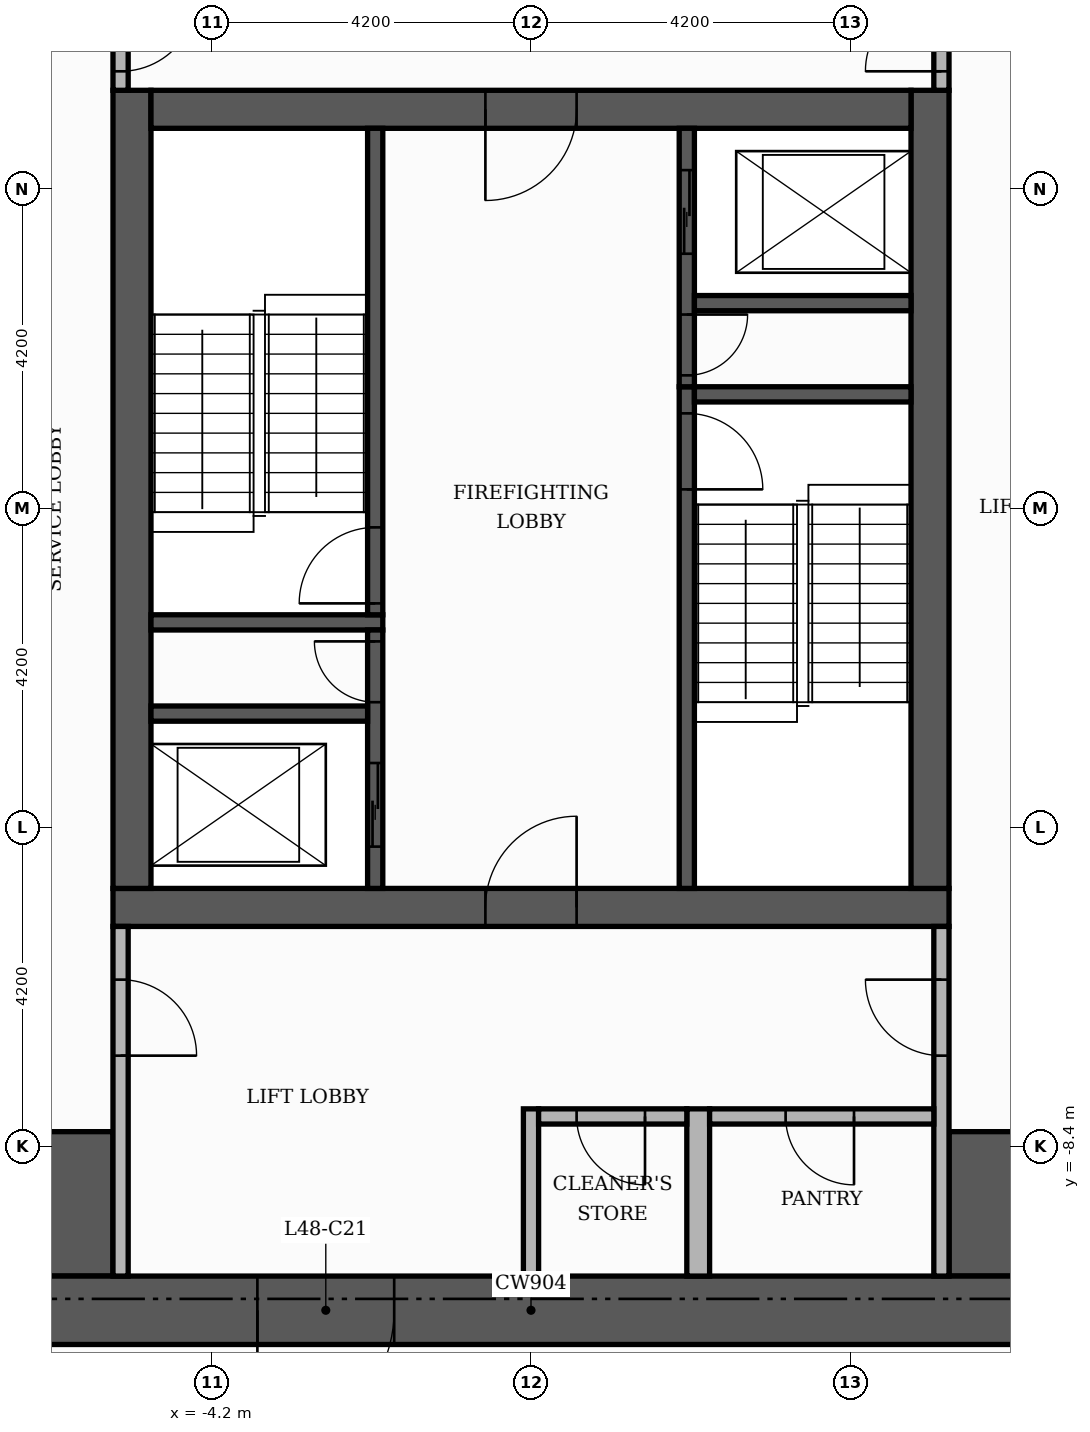
"""IFC4 building model, lengths in metres.
Left out: names, types, materials, properties, quantities, classifications, styles, units other than length and angle.
Written with IfcOpenShell. Run it as: python <this file> out.ifc"""

import sys

from ifc_helpers import new_model, si_unit, direction, frame, frame_2d, origin, place, context, subcontext, project, spatial, rectangle, extrude, element, fill, save


model = new_model("IFC4")
c1 = context("Model", 3, precision=1e-05, world=origin(), true_north=direction((0.0, 1.0)))
c2 = subcontext(c1, "Body", "Model", "MODEL_VIEW")
j1 = project(units=[si_unit("LENGTHUNIT", "METRE"), si_unit("PLANEANGLEUNIT", "RADIAN")], contexts=[c1])
p1 = place(None, origin())
s1 = spatial("IfcSite", under=j1, at=p1, CompositionType="ELEMENT")
p2 = place(p1, origin())
s2 = spatial("IfcBuilding", under=s1, at=p2, CompositionType="ELEMENT")
p3 = place(p2, frame((0.0, 0.0, 204.0)))
s3 = spatial("IfcBuildingStorey", under=s2, at=p3, CompositionType="ELEMENT", Elevation=204.0)
p4 = place(p3, frame((-5.5, -5.25, 0.0), z_axis=(0.0, 0.0, 1.0), x_axis=(1.0, 0.0, 0.0)))
e1 = element("IfcWall", 1, at=p4, inside=s3, PredefinedType="SHEAR", context=c2, shape_type="SweptSolid", body=[
    extrude(rectangle(XDim=11.0, YDim=0.5, at=frame_2d((5.5, 0.0))), origin(), (0.0, 0.0, 1.0), 3.48),
])
p5 = place(p4, frame((4.9, 0.0, 0.0)))
e2 = element("IfcOpeningElement", 2, at=p5, cuts=e1, PredefinedType="OPENING", context=c2, shape_type="SweptSolid", body=[
    extrude(rectangle(XDim=1.2, YDim=2.1, at=frame_2d((0.6, 1.05))), frame((0.0, 0.26, 0.0), z_axis=(0.0, -1.0, 0.0), x_axis=(1.0, 0.0, 0.0)), (0.0, 0.0, 1.0), 0.52),
])
for number, where, z_axis, x_axis in (
    (3, (-5.25, -5.0, 0.0), (0.0, 0.0, 1.0), (0.0, 1.0, 0.0)),
    (4, (5.25, -5.0, 0.0), (0.0, 0.0, 1.0), (0.0, 1.0, 0.0)),
):
    element("IfcWall", number, at=place(p3, frame(where, z_axis=z_axis, x_axis=x_axis)), inside=s3, PredefinedType="SHEAR", context=c2, shape_type="SweptSolid", body=[
        extrude(rectangle(XDim=10.5, YDim=0.5, at=frame_2d((5.25, 0.0))), origin(), (0.0, 0.0, 1.0), 3.48),
    ])
p6 = place(p3, frame((-5.0, 5.25, 0.0), z_axis=(0.0, 0.0, 1.0), x_axis=(1.0, 0.0, 0.0)))
e5 = element("IfcWall", 5, at=p6, inside=s3, PredefinedType="SHEAR", context=c2, shape_type="SweptSolid", body=[
    extrude(rectangle(XDim=10.0, YDim=0.5, at=frame_2d((5.0, 0.0))), origin(), (0.0, 0.0, 1.0), 3.48),
])
p7 = place(p6, frame((4.4, 0.0, 0.0)))
e6 = element("IfcOpeningElement", 6, at=p7, cuts=e5, PredefinedType="OPENING", context=c2, shape_type="SweptSolid", body=[
    extrude(rectangle(XDim=1.2, YDim=2.1, at=frame_2d((0.6, 1.05))), frame((0.0, 0.26, 0.0), z_axis=(0.0, -1.0, 0.0), x_axis=(1.0, 0.0, 0.0)), (0.0, 0.0, 1.0), 0.52),
])
for number, where, z_axis, x_axis in (
    (7, (-10.1, -9.15, 0.0), (0.0, 0.0, 1.0), (1.0, 0.0, 0.0)),
    (8, (5.5, -9.15, 0.0), (0.0, 0.0, 1.0), (1.0, 0.0, 0.0)),
):
    element("IfcWall", number, at=place(p3, frame(where, z_axis=z_axis, x_axis=x_axis)), inside=s3, PredefinedType="SHEAR", context=c2, shape_type="SweptSolid", body=[
        extrude(rectangle(XDim=4.6, YDim=1.9, at=frame_2d((2.3, 0.0))), origin(), (0.0, 0.0, 1.0), 3.48),
    ])
p8 = place(p3, frame((2.05, -5.0, 0.0), z_axis=(0.0, 0.0, 1.0), x_axis=(0.0, 1.0, 0.0)))
e9 = element("IfcWall", 9, at=p8, inside=s3, PredefinedType="SHEAR", context=c2, shape_type="SweptSolid", body=[
    extrude(rectangle(XDim=6.6, YDim=0.2, at=frame_2d((3.3, 0.0))), origin(), (0.0, 0.0, 1.0), 3.48),
])
p9 = place(p8, frame((5.25, 0.0, 0.0)))
e10 = element("IfcOpeningElement", 10, at=p9, cuts=e9, PredefinedType="OPENING", context=c2, shape_type="SweptSolid", body=[
    extrude(rectangle(XDim=1.0, YDim=2.1, at=frame_2d((0.5, 1.05))), frame((0.0, 0.11, 0.0), z_axis=(0.0, -1.0, 0.0), x_axis=(1.0, 0.0, 0.0)), (0.0, 0.0, 1.0), 0.22),
])
p10 = place(p3, frame((-5.0, -1.5, 0.0), z_axis=(0.0, 0.0, 1.0), x_axis=(1.0, 0.0, 0.0)))
e11 = element("IfcWall", 11, at=p10, inside=s3, PredefinedType="SHEAR", context=c2, shape_type="SweptSolid", body=[
    extrude(rectangle(XDim=3.05, YDim=0.2, at=frame_2d((1.525, 0.0))), origin(), (0.0, 0.0, 1.0), 3.48),
])
p11 = place(p3, frame((-2.05, -1.4, 0.0), z_axis=(0.0, 0.0, 1.0), x_axis=(0.0, 1.0, 0.0)))
e12 = element("IfcWall", 12, at=p11, inside=s3, PredefinedType="SHEAR", context=c2, shape_type="SweptSolid", body=[
    extrude(rectangle(XDim=6.4, YDim=0.2, at=frame_2d((3.2, 0.0))), origin(), (0.0, 0.0, 1.0), 3.48),
])
p12 = place(p11, frame((0.15, 0.0, 0.0)))
e13 = element("IfcOpeningElement", 13, at=p12, cuts=e12, PredefinedType="OPENING", context=c2, shape_type="SweptSolid", body=[
    extrude(rectangle(XDim=1.0, YDim=2.1, at=frame_2d((0.5, 1.05))), frame((0.0, 0.11, 0.0), z_axis=(0.0, -1.0, 0.0), x_axis=(1.0, 0.0, 0.0)), (0.0, 0.0, 1.0), 0.22),
])
p13 = place(p3, frame((2.15, 1.5, 0.0), z_axis=(0.0, 0.0, 1.0), x_axis=(1.0, 0.0, 0.0)))
e14 = element("IfcWall", 14, at=p13, inside=s3, PredefinedType="SHEAR", context=c2, shape_type="SweptSolid", body=[
    extrude(rectangle(XDim=2.85, YDim=0.2, at=frame_2d((1.425, 0.0))), origin(), (0.0, 0.0, 1.0), 3.48),
])
p14 = place(p3, frame((-2.05, -5.0, 0.0), z_axis=(0.0, 0.0, 1.0), x_axis=(0.0, 1.0, 0.0)))
e15 = element("IfcWall", 15, at=p14, inside=s3, PredefinedType="SHEAR", context=c2, shape_type="SweptSolid", body=[
    extrude(rectangle(XDim=3.4, YDim=0.2, at=frame_2d((1.7, 0.0))), origin(), (0.0, 0.0, 1.0), 3.48),
])
p15 = place(p14, frame((0.55, 0.0, 0.0)))
e16 = element("IfcOpeningElement", 16, at=p15, cuts=e15, PredefinedType="OPENING", context=c2, shape_type="SweptSolid", body=[
    extrude(rectangle(XDim=1.1, YDim=2.1, at=frame_2d((0.55, 1.05))), frame((0.0, 0.11, 0.0), z_axis=(0.0, -1.0, 0.0), x_axis=(1.0, 0.0, 0.0)), (0.0, 0.0, 1.0), 0.22),
])
p16 = place(p14, frame((2.45, 0.0, 0.0)))
e17 = element("IfcOpeningElement", 17, at=p16, cuts=e15, PredefinedType="OPENING", context=c2, shape_type="SweptSolid", body=[
    extrude(rectangle(XDim=0.8, YDim=2.1, at=frame_2d((0.4, 1.05))), frame((0.0, 0.11, 0.0), z_axis=(0.0, -1.0, 0.0), x_axis=(1.0, 0.0, 0.0)), (0.0, 0.0, 1.0), 0.22),
])
p17 = place(p3, frame((-5.0, -2.7, 0.0), z_axis=(0.0, 0.0, 1.0), x_axis=(1.0, 0.0, 0.0)))
e18 = element("IfcWall", 18, at=p17, inside=s3, PredefinedType="SHEAR", context=c2, shape_type="SweptSolid", body=[
    extrude(rectangle(XDim=2.85, YDim=0.2, at=frame_2d((1.425, 0.0))), origin(), (0.0, 0.0, 1.0), 3.48),
])
p18 = place(p3, frame((2.05, 1.6, 0.0), z_axis=(0.0, 0.0, 1.0), x_axis=(0.0, 1.0, 0.0)))
e19 = element("IfcWall", 19, at=p18, inside=s3, PredefinedType="SHEAR", context=c2, shape_type="SweptSolid", body=[
    extrude(rectangle(XDim=3.4, YDim=0.2, at=frame_2d((1.7, 0.0))), origin(), (0.0, 0.0, 1.0), 3.48),
])
p19 = place(p18, frame((1.75, 0.0, 0.0)))
e20 = element("IfcOpeningElement", 20, at=p19, cuts=e19, PredefinedType="OPENING", context=c2, shape_type="SweptSolid", body=[
    extrude(rectangle(XDim=1.1, YDim=2.1, at=frame_2d((0.55, 1.05))), frame((0.0, 0.11, 0.0), z_axis=(0.0, -1.0, 0.0), x_axis=(1.0, 0.0, 0.0)), (0.0, 0.0, 1.0), 0.22),
])
p20 = place(p18, frame((0.15, 0.0, 0.0)))
e21 = element("IfcOpeningElement", 21, at=p20, cuts=e19, PredefinedType="OPENING", context=c2, shape_type="SweptSolid", body=[
    extrude(rectangle(XDim=0.8, YDim=2.1, at=frame_2d((0.4, 1.05))), frame((0.0, 0.11, 0.0), z_axis=(0.0, -1.0, 0.0), x_axis=(1.0, 0.0, 0.0)), (0.0, 0.0, 1.0), 0.22),
])
p21 = place(p3, frame((2.15, 2.7, 0.0), z_axis=(0.0, 0.0, 1.0), x_axis=(1.0, 0.0, 0.0)))
e22 = element("IfcWall", 22, at=p21, inside=s3, PredefinedType="SHEAR", context=c2, shape_type="SweptSolid", body=[
    extrude(rectangle(XDim=2.85, YDim=0.2, at=frame_2d((1.425, 0.0))), origin(), (0.0, 0.0, 1.0), 3.48),
])
p22 = place(p3, frame((-11.0, -10.55, 0.0), z_axis=(0.0, 0.0, 1.0), x_axis=(1.0, 0.0, 0.0)))
e23 = element("IfcWall", 23, at=p22, inside=s3, PredefinedType="SHEAR", context=c2, shape_type="SweptSolid", body=[
    extrude(rectangle(XDim=22.0, YDim=0.9, at=frame_2d((11.0, 0.0))), origin(), (0.0, 0.0, 1.0), 3.48),
])
p23 = place(p22, frame((7.4, 0.0, 0.0)))
e24 = element("IfcOpeningElement", 24, at=p23, cuts=e23, PredefinedType="OPENING", context=c2, shape_type="SweptSolid", body=[
    extrude(rectangle(XDim=1.8, YDim=2.2, at=frame_2d((0.9, 1.1))), frame((0.0, 0.46, 0.0), z_axis=(0.0, -1.0, 0.0), x_axis=(1.0, 0.0, 0.0)), (0.0, 0.0, 1.0), 0.92),
])
p24 = place(p3, frame((-5.4, -10.1, 0.0), z_axis=(0.0, 0.0, 1.0), x_axis=(0.0, 1.0, 0.0)))
e25 = element("IfcWall", 25, at=p24, inside=s3, PredefinedType="PARTITIONING", context=c2, shape_type="SweptSolid", body=[
    extrude(rectangle(XDim=4.6, YDim=0.2, at=frame_2d((2.3, 0.0))), origin(), (0.0, 0.0, 1.0), 3.48),
])
p25 = place(p24, frame((2.9, 0.0, 0.0)))
e26 = element("IfcOpeningElement", 26, at=p25, cuts=e25, PredefinedType="OPENING", context=c2, shape_type="SweptSolid", body=[
    extrude(rectangle(XDim=1.0, YDim=2.1, at=frame_2d((0.5, 1.05))), frame((0.0, 0.11, 0.0), z_axis=(0.0, -1.0, 0.0), x_axis=(1.0, 0.0, 0.0)), (0.0, 0.0, 1.0), 0.22),
])
p26 = place(p3, frame((0.0, -10.1, 0.0), z_axis=(0.0, 0.0, 1.0), x_axis=(0.0, 1.0, 0.0)))
e27 = element("IfcWall", 27, at=p26, inside=s3, PredefinedType="PARTITIONING", context=c2, shape_type="SweptSolid", body=[
    extrude(rectangle(XDim=2.2, YDim=0.2, at=frame_2d((1.1, 0.0))), origin(), (0.0, 0.0, 1.0), 3.48),
])
p27 = place(p3, frame((2.2, -10.1, 0.0), z_axis=(0.0, 0.0, 1.0), x_axis=(0.0, 1.0, 0.0)))
e28 = element("IfcWall", 28, at=p27, inside=s3, PredefinedType="PARTITIONING", context=c2, shape_type="SweptSolid", body=[
    extrude(rectangle(XDim=2.2, YDim=0.3, at=frame_2d((1.1, 0.0))), origin(), (0.0, 0.0, 1.0), 3.48),
])
p28 = place(p3, frame((5.4, -10.1, 0.0), z_axis=(0.0, 0.0, 1.0), x_axis=(0.0, 1.0, 0.0)))
e29 = element("IfcWall", 29, at=p28, inside=s3, PredefinedType="PARTITIONING", context=c2, shape_type="SweptSolid", body=[
    extrude(rectangle(XDim=4.6, YDim=0.2, at=frame_2d((2.3, 0.0))), origin(), (0.0, 0.0, 1.0), 3.48),
])
p29 = place(p28, frame((2.9, 0.0, 0.0)))
e30 = element("IfcOpeningElement", 30, at=p29, cuts=e29, PredefinedType="OPENING", context=c2, shape_type="SweptSolid", body=[
    extrude(rectangle(XDim=1.0, YDim=2.1, at=frame_2d((0.5, 1.05))), frame((0.0, 0.11, 0.0), z_axis=(0.0, -1.0, 0.0), x_axis=(1.0, 0.0, 0.0)), (0.0, 0.0, 1.0), 0.22),
])
p30 = place(p3, frame((0.1, -8.0, 0.0), z_axis=(0.0, 0.0, 1.0), x_axis=(1.0, 0.0, 0.0)))
e31 = element("IfcWall", 31, at=p30, inside=s3, PredefinedType="PARTITIONING", context=c2, shape_type="SweptSolid", body=[
    extrude(rectangle(XDim=1.95, YDim=0.2, at=frame_2d((0.975, 0.0))), origin(), (0.0, 0.0, 1.0), 3.48),
])
p31 = place(p30, frame((0.5, 0.0, 0.0)))
e32 = element("IfcOpeningElement", 32, at=p31, cuts=e31, PredefinedType="OPENING", context=c2, shape_type="SweptSolid", body=[
    extrude(rectangle(XDim=0.9, YDim=2.1, at=frame_2d((0.45, 1.05))), frame((0.0, 0.11, 0.0), z_axis=(0.0, -1.0, 0.0), x_axis=(1.0, 0.0, 0.0)), (0.0, 0.0, 1.0), 0.22),
])
p32 = place(p3, frame((2.35, -8.0, 0.0), z_axis=(0.0, 0.0, 1.0), x_axis=(1.0, 0.0, 0.0)))
e33 = element("IfcWall", 33, at=p32, inside=s3, PredefinedType="PARTITIONING", context=c2, shape_type="SweptSolid", body=[
    extrude(rectangle(XDim=2.95, YDim=0.2, at=frame_2d((1.475, 0.0))), origin(), (0.0, 0.0, 1.0), 3.48),
])
p33 = place(p32, frame((1.0, 0.0, 0.0)))
e34 = element("IfcOpeningElement", 34, at=p33, cuts=e33, PredefinedType="OPENING", context=c2, shape_type="SweptSolid", body=[
    extrude(rectangle(XDim=0.9, YDim=2.1, at=frame_2d((0.45, 1.05))), frame((0.0, 0.11, 0.0), z_axis=(0.0, -1.0, 0.0), x_axis=(1.0, 0.0, 0.0)), (0.0, 0.0, 1.0), 0.22),
])
p34 = place(p3, frame((-5.4, 5.5, 0.0), z_axis=(0.0, 0.0, 1.0), x_axis=(0.0, 1.0, 0.0)))
e35 = element("IfcWall", 35, at=p34, inside=s3, PredefinedType="PARTITIONING", context=c2, shape_type="SweptSolid", body=[
    extrude(rectangle(XDim=1.55, YDim=0.2, at=frame_2d((0.775, 0.0))), origin(), (0.0, 0.0, 1.0), 3.48),
])
p35 = place(p34, frame((0.25, 0.0, 0.0)))
e36 = element("IfcOpeningElement", 36, at=p35, cuts=e35, PredefinedType="OPENING", context=c2, shape_type="SweptSolid", body=[
    extrude(rectangle(XDim=1.0, YDim=2.1, at=frame_2d((0.5, 1.05))), frame((0.0, 0.11, 0.0), z_axis=(0.0, -1.0, 0.0), x_axis=(1.0, 0.0, 0.0)), (0.0, 0.0, 1.0), 0.22),
])
p36 = place(p3, frame((5.4, 5.5, 0.0), z_axis=(0.0, 0.0, 1.0), x_axis=(0.0, 1.0, 0.0)))
e37 = element("IfcWall", 37, at=p36, inside=s3, PredefinedType="PARTITIONING", context=c2, shape_type="SweptSolid", body=[
    extrude(rectangle(XDim=4.6, YDim=0.2, at=frame_2d((2.3, 0.0))), origin(), (0.0, 0.0, 1.0), 3.48),
])
p37 = place(p36, frame((0.25, 0.0, 0.0)))
e38 = element("IfcOpeningElement", 38, at=p37, cuts=e37, PredefinedType="OPENING", context=c2, shape_type="SweptSolid", body=[
    extrude(rectangle(XDim=1.0, YDim=2.1, at=frame_2d((0.5, 1.05))), frame((0.0, 0.11, 0.0), z_axis=(0.0, -1.0, 0.0), x_axis=(1.0, 0.0, 0.0)), (0.0, 0.0, 1.0), 0.22),
])
p38 = place(p19, origin())
e39 = element("IfcDoor", 39, at=p38, inside=s3, OperationType="SLIDING_TO_LEFT", PredefinedType="DOOR", context=c2, shape_type="SweptSolid", body=[
    extrude(rectangle(XDim=1.1, YDim=2.1, at=frame_2d((0.55, 1.05))), frame((0.0, 0.025, 0.0), z_axis=(0.0, -1.0, 0.0), x_axis=(1.0, 0.0, 0.0)), (0.0, 0.0, 1.0), 0.05),
])
fill(e20, e39)
p39 = place(p15, origin())
e40 = element("IfcDoor", 40, at=p39, inside=s3, OperationType="SLIDING_TO_LEFT", PredefinedType="DOOR", context=c2, shape_type="SweptSolid", body=[
    extrude(rectangle(XDim=1.1, YDim=2.1, at=frame_2d((0.55, 1.05))), frame((0.0, 0.025, 0.0), z_axis=(0.0, -1.0, 0.0), x_axis=(1.0, 0.0, 0.0)), (0.0, 0.0, 1.0), 0.05),
])
fill(e16, e40)
p40 = place(p12, origin())
e41 = element("IfcDoor", 41, at=p40, inside=s3, OperationType="SINGLE_SWING_LEFT", PredefinedType="DOOR", context=c2, shape_type="SweptSolid", body=[
    extrude(rectangle(XDim=1.0, YDim=2.1, at=frame_2d((0.5, 1.05))), frame((0.0, 0.025, 0.0), z_axis=(0.0, -1.0, 0.0), x_axis=(1.0, 0.0, 0.0)), (0.0, 0.0, 1.0), 0.05),
])
fill(e13, e41)
p41 = place(p9, frame((1.0, 0.0, 0.0), z_axis=(0.0, 0.0, 1.0), x_axis=(-1.0, 0.0, 0.0)))
e42 = element("IfcDoor", 42, at=p41, inside=s3, OperationType="SINGLE_SWING_LEFT", PredefinedType="DOOR", context=c2, shape_type="SweptSolid", body=[
    extrude(rectangle(XDim=1.0, YDim=2.1, at=frame_2d((0.5, 1.05))), frame((0.0, 0.025, 0.0), z_axis=(0.0, -1.0, 0.0), x_axis=(1.0, 0.0, 0.0)), (0.0, 0.0, 1.0), 0.05),
])
fill(e10, e42)
p42 = place(p20, frame((0.8, 0.0, 0.0), z_axis=(0.0, 0.0, 1.0), x_axis=(-1.0, 0.0, 0.0)))
e43 = element("IfcDoor", 43, at=p42, inside=s3, OperationType="SINGLE_SWING_RIGHT", PredefinedType="DOOR", context=c2, shape_type="SweptSolid", body=[
    extrude(rectangle(XDim=0.8, YDim=2.1, at=frame_2d((0.4, 1.05))), frame((0.0, 0.025, 0.0), z_axis=(0.0, -1.0, 0.0), x_axis=(1.0, 0.0, 0.0)), (0.0, 0.0, 1.0), 0.05),
])
fill(e21, e43)
p43 = place(p16, origin())
e44 = element("IfcDoor", 44, at=p43, inside=s3, OperationType="SINGLE_SWING_RIGHT", PredefinedType="DOOR", context=c2, shape_type="SweptSolid", body=[
    extrude(rectangle(XDim=0.8, YDim=2.1, at=frame_2d((0.4, 1.05))), frame((0.0, 0.025, 0.0), z_axis=(0.0, -1.0, 0.0), x_axis=(1.0, 0.0, 0.0)), (0.0, 0.0, 1.0), 0.05),
])
fill(e17, e44)
p44 = place(p7, frame((1.2, 0.0, 0.0), z_axis=(0.0, 0.0, 1.0), x_axis=(-1.0, 0.0, 0.0)))
e45 = element("IfcDoor", 45, at=p44, inside=s3, OperationType="SINGLE_SWING_LEFT", PredefinedType="DOOR", context=c2, shape_type="SweptSolid", body=[
    extrude(rectangle(XDim=1.2, YDim=2.1, at=frame_2d((0.6, 1.05))), frame((0.0, 0.025, 0.0), z_axis=(0.0, -1.0, 0.0), x_axis=(1.0, 0.0, 0.0)), (0.0, 0.0, 1.0), 0.05),
])
fill(e6, e45)
p45 = place(p5, origin())
e46 = element("IfcDoor", 46, at=p45, inside=s3, OperationType="SINGLE_SWING_RIGHT", PredefinedType="DOOR", context=c2, shape_type="SweptSolid", body=[
    extrude(rectangle(XDim=1.2, YDim=2.1, at=frame_2d((0.6, 1.05))), frame((0.0, 0.025, 0.0), z_axis=(0.0, -1.0, 0.0), x_axis=(1.0, 0.0, 0.0)), (0.0, 0.0, 1.0), 0.05),
])
fill(e2, e46)
p46 = place(p35, frame((1.0, 0.0, 0.0), z_axis=(0.0, 0.0, 1.0), x_axis=(-1.0, 0.0, 0.0)))
e47 = element("IfcDoor", 47, at=p46, inside=s3, OperationType="SINGLE_SWING_RIGHT", PredefinedType="DOOR", context=c2, shape_type="SweptSolid", body=[
    extrude(rectangle(XDim=1.0, YDim=2.1, at=frame_2d((0.5, 1.05))), frame((0.0, 0.025, 0.0), z_axis=(0.0, -1.0, 0.0), x_axis=(1.0, 0.0, 0.0)), (0.0, 0.0, 1.0), 0.05),
])
fill(e36, e47)
p47 = place(p37, origin())
e48 = element("IfcDoor", 48, at=p47, inside=s3, OperationType="SINGLE_SWING_LEFT", PredefinedType="DOOR", context=c2, shape_type="SweptSolid", body=[
    extrude(rectangle(XDim=1.0, YDim=2.1, at=frame_2d((0.5, 1.05))), frame((0.0, 0.025, 0.0), z_axis=(0.0, -1.0, 0.0), x_axis=(1.0, 0.0, 0.0)), (0.0, 0.0, 1.0), 0.05),
])
fill(e38, e48)
p48 = place(p25, frame((1.0, 0.0, 0.0), z_axis=(0.0, 0.0, 1.0), x_axis=(-1.0, 0.0, 0.0)))
e49 = element("IfcDoor", 49, at=p48, inside=s3, OperationType="SINGLE_SWING_LEFT", PredefinedType="DOOR", context=c2, shape_type="SweptSolid", body=[
    extrude(rectangle(XDim=1.0, YDim=2.1, at=frame_2d((0.5, 1.05))), frame((0.0, 0.025, 0.0), z_axis=(0.0, -1.0, 0.0), x_axis=(1.0, 0.0, 0.0)), (0.0, 0.0, 1.0), 0.05),
])
fill(e26, e49)
p49 = place(p29, origin())
e50 = element("IfcDoor", 50, at=p49, inside=s3, OperationType="SINGLE_SWING_RIGHT", PredefinedType="DOOR", context=c2, shape_type="SweptSolid", body=[
    extrude(rectangle(XDim=1.0, YDim=2.1, at=frame_2d((0.5, 1.05))), frame((0.0, 0.025, 0.0), z_axis=(0.0, -1.0, 0.0), x_axis=(1.0, 0.0, 0.0)), (0.0, 0.0, 1.0), 0.05),
])
fill(e30, e50)
p50 = place(p23, frame((1.8, 0.0, 0.0), z_axis=(0.0, 0.0, 1.0), x_axis=(-1.0, 0.0, 0.0)))
e51 = element("IfcDoor", 51, at=p50, inside=s3, OperationType="DOUBLE_DOOR_SINGLE_SWING", PredefinedType="DOOR", context=c2, shape_type="SweptSolid", body=[
    extrude(rectangle(XDim=1.8, YDim=2.2, at=frame_2d((0.9, 1.1))), frame((0.0, 0.025, 0.0), z_axis=(0.0, -1.0, 0.0), x_axis=(1.0, 0.0, 0.0)), (0.0, 0.0, 1.0), 0.05),
])
fill(e24, e51)
p51 = place(p31, frame((0.9, 0.0, 0.0), z_axis=(0.0, 0.0, 1.0), x_axis=(-1.0, 0.0, 0.0)))
e52 = element("IfcDoor", 52, at=p51, inside=s3, OperationType="SINGLE_SWING_RIGHT", PredefinedType="DOOR", context=c2, shape_type="SweptSolid", body=[
    extrude(rectangle(XDim=0.9, YDim=2.1, at=frame_2d((0.45, 1.05))), frame((0.0, 0.025, 0.0), z_axis=(0.0, -1.0, 0.0), x_axis=(1.0, 0.0, 0.0)), (0.0, 0.0, 1.0), 0.05),
])
fill(e32, e52)
p52 = place(p33, frame((0.9, 0.0, 0.0), z_axis=(0.0, 0.0, 1.0), x_axis=(-1.0, 0.0, 0.0)))
e53 = element("IfcDoor", 53, at=p52, inside=s3, OperationType="SINGLE_SWING_RIGHT", PredefinedType="DOOR", context=c2, shape_type="SweptSolid", body=[
    extrude(rectangle(XDim=0.9, YDim=2.1, at=frame_2d((0.45, 1.05))), frame((0.0, 0.025, 0.0), z_axis=(0.0, -1.0, 0.0), x_axis=(1.0, 0.0, 0.0)), (0.0, 0.0, 1.0), 0.05),
])
fill(e34, e53)
save(model, sys.argv[1])
